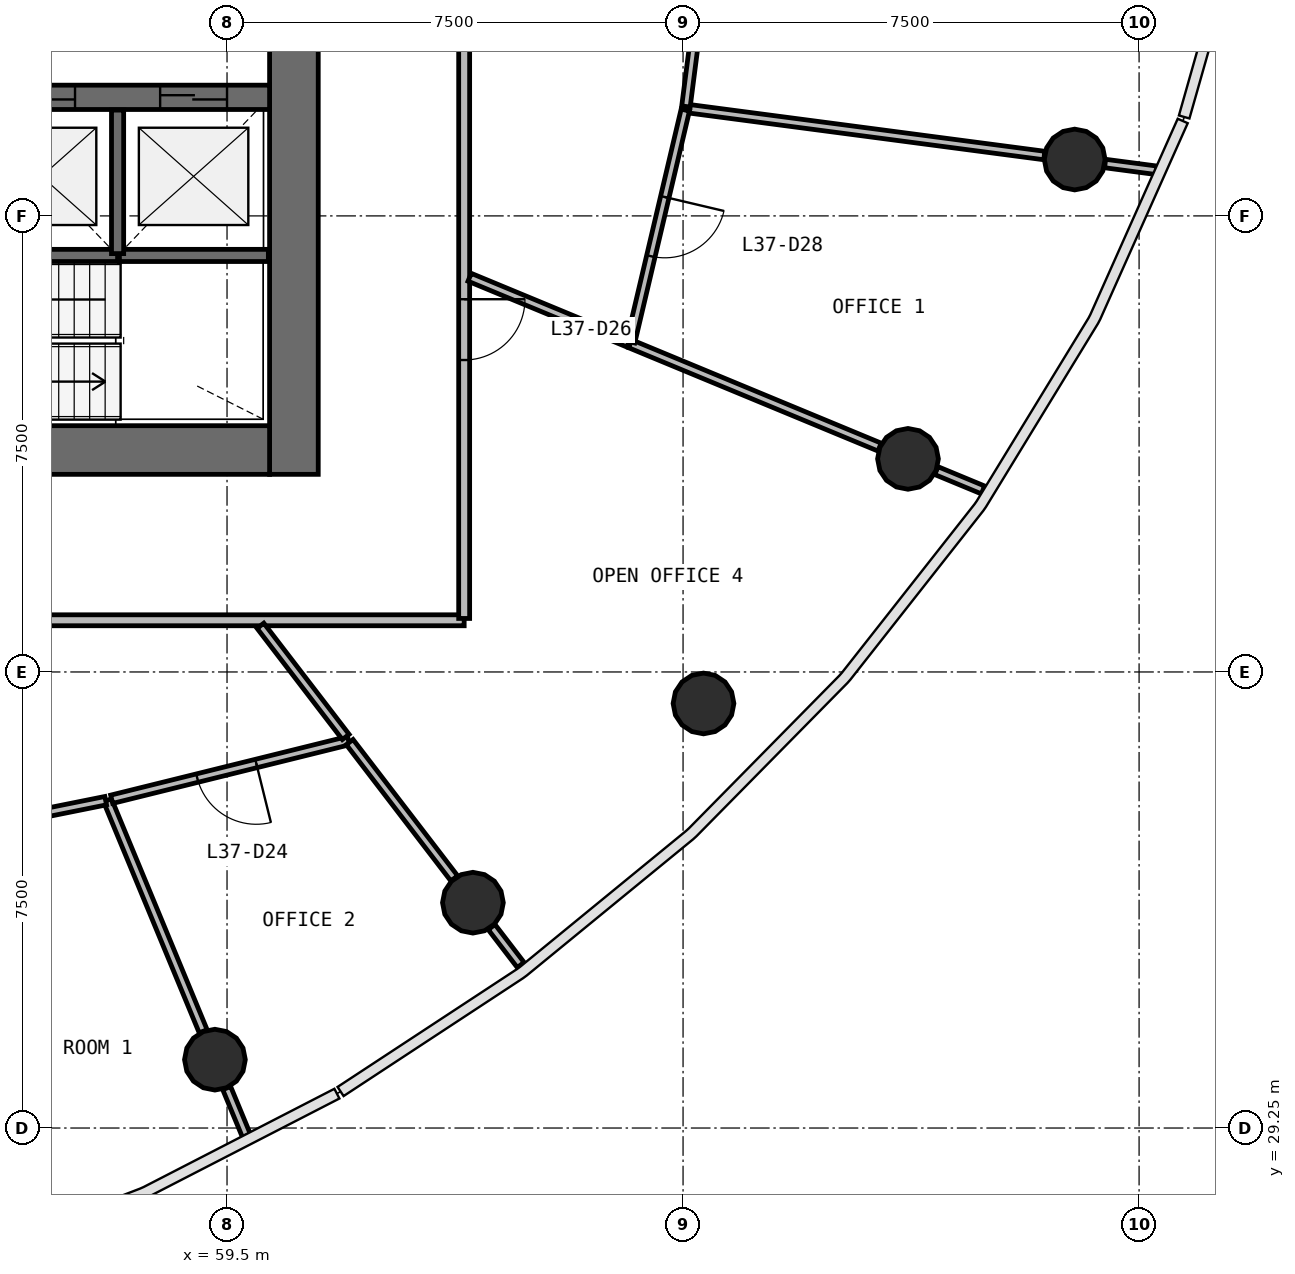
"""IFC4 building model, lengths in metres.
Left out: names, types, materials, properties, quantities, classifications, styles, units other than length and angle.
Written with IfcOpenShell. Run it as: python <this file> out.ifc"""

import sys

from ifc_helpers import new_model, si_unit, direction, frame, frame_2d, origin, origin_2d, place, context, subcontext, project, spatial, rectangle, circle, extrude, source, transform, mapped, element, fill, save


model = new_model("IFC4")
c1 = context("Model", 3, precision=1e-05, world=origin(), true_north=direction((0.0, 1.0)))
c2 = subcontext(c1, "Body", "Model", "MODEL_VIEW")
j1 = project(units=[si_unit("LENGTHUNIT", "METRE"), si_unit("PLANEANGLEUNIT", "RADIAN")], contexts=[c1])
p1 = place(None, origin())
s1 = spatial("IfcSite", under=j1, at=p1, CompositionType="ELEMENT")
p2 = place(p1, origin())
s2 = spatial("IfcBuilding", under=s1, at=p2, CompositionType="ELEMENT")
p3 = place(p2, frame((0.0, 0.0, 156.5)))
s3 = spatial("IfcBuildingStorey", under=s2, at=p3, CompositionType="ELEMENT", Elevation=156.5)
p4 = place(p3, frame((60.6, 40.0, 0.0), z_axis=(0.0, 0.0, 1.0), x_axis=(0.0, 1.0, 0.0)))
e1 = element("IfcWall", 1, at=p4, inside=s3, PredefinedType="SHEAR", context=c2, shape_type="SweptSolid", body=[
    extrude(rectangle(XDim=16.0, YDim=0.8, at=frame_2d((8.0, 0.0))), origin(), (0.0, 0.0, 1.0), 3.9),
])
p5 = place(p4, frame((7.1, 0.0, 0.0)))
e2 = element("IfcOpeningElement", 2, at=p5, cuts=e1, PredefinedType="OPENING", context=c2, shape_type="SweptSolid", body=[
    extrude(rectangle(XDim=1.8, YDim=2.1, at=frame_2d((0.9, 1.05))), frame((0.0, 0.41, 0.0), z_axis=(0.0, -1.0, 0.0), x_axis=(1.0, 0.0, 0.0)), (0.0, 0.0, 1.0), 0.82),
])
p6 = place(p3, frame((43.8, 40.4, 0.0), z_axis=(0.0, 0.0, 1.0), x_axis=(1.0, 0.0, 0.0)))
e3 = element("IfcWall", 3, at=p6, inside=s3, PredefinedType="SHEAR", context=c2, shape_type="SweptSolid", body=[
    extrude(rectangle(XDim=16.4, YDim=0.8, at=frame_2d((8.2, 0.0))), origin(), (0.0, 0.0, 1.0), 3.9),
])
p7 = place(p6, frame((10.1, 0.0, 0.0)))
e4 = element("IfcOpeningElement", 4, at=p7, cuts=e3, PredefinedType="OPENING", context=c2, shape_type="SweptSolid", body=[
    extrude(rectangle(XDim=1.2, YDim=2.1, at=frame_2d((0.6, 1.05))), frame((0.0, 0.41, 0.0), z_axis=(0.0, -1.0, 0.0), x_axis=(1.0, 0.0, 0.0)), (0.0, 0.0, 1.0), 0.82),
])
p8 = place(p6, frame((7.05, 0.0, 0.0)))
e5 = element("IfcOpeningElement", 5, at=p8, cuts=e3, PredefinedType="OPENING", context=c2, shape_type="SweptSolid", body=[
    extrude(rectangle(XDim=1.1, YDim=2.1, at=frame_2d((0.55, 1.05))), frame((0.0, 0.41, 0.0), z_axis=(0.0, -1.0, 0.0), x_axis=(1.0, 0.0, 0.0)), (0.0, 0.0, 1.0), 0.82),
])
p9 = place(p6, frame((0.5, 0.0, 0.0)))
e6 = element("IfcOpeningElement", 6, at=p9, cuts=e3, PredefinedType="OPENING", context=c2, shape_type="SweptSolid", body=[
    extrude(rectangle(XDim=0.8, YDim=2.1, at=frame_2d((0.4, 1.05))), frame((0.0, 0.41, 0.0), z_axis=(0.0, -1.0, 0.0), x_axis=(1.0, 0.0, 0.0)), (0.0, 0.0, 1.0), 0.82),
])
p10 = place(p3, frame((43.8, 46.2, 0.0), z_axis=(0.0, 0.0, 1.0), x_axis=(1.0, 0.0, 0.0)))
e7 = element("IfcWall", 7, at=p10, inside=s3, PredefinedType="SHEAR", context=c2, shape_type="SweptSolid", body=[
    extrude(rectangle(XDim=16.4, YDim=0.4, at=frame_2d((8.2, 0.0))), origin(), (0.0, 0.0, 1.0), 3.9),
])
p11 = place(p10, frame((9.6, 0.0, 0.0)))
e8 = element("IfcOpeningElement", 8, at=p11, cuts=e7, PredefinedType="OPENING", context=c2, shape_type="SweptSolid", body=[
    extrude(rectangle(XDim=1.1, YDim=2.1, at=frame_2d((0.55, 1.05))), frame((0.0, 0.21, 0.0), z_axis=(0.0, -1.0, 0.0), x_axis=(1.0, 0.0, 0.0)), (0.0, 0.0, 1.0), 0.42),
])
p12 = place(p10, frame((12.1, 0.0, 0.0)))
e9 = element("IfcOpeningElement", 9, at=p12, cuts=e7, PredefinedType="OPENING", context=c2, shape_type="SweptSolid", body=[
    extrude(rectangle(XDim=1.1, YDim=2.1, at=frame_2d((0.55, 1.05))), frame((0.0, 0.21, 0.0), z_axis=(0.0, -1.0, 0.0), x_axis=(1.0, 0.0, 0.0)), (0.0, 0.0, 1.0), 0.42),
])
p13 = place(p10, frame((14.6, 0.0, 0.0)))
e10 = element("IfcOpeningElement", 10, at=p13, cuts=e7, PredefinedType="OPENING", context=c2, shape_type="SweptSolid", body=[
    extrude(rectangle(XDim=1.1, YDim=2.1, at=frame_2d((0.55, 1.05))), frame((0.0, 0.21, 0.0), z_axis=(0.0, -1.0, 0.0), x_axis=(1.0, 0.0, 0.0)), (0.0, 0.0, 1.0), 0.42),
])
p14 = place(p10, frame((2.45, 0.0, 0.0)))
e11 = element("IfcOpeningElement", 11, at=p14, cuts=e7, PredefinedType="OPENING", context=c2, shape_type="SweptSolid", body=[
    extrude(rectangle(XDim=0.9, YDim=2.1, at=frame_2d((0.45, 1.05))), frame((0.0, 0.21, 0.0), z_axis=(0.0, -1.0, 0.0), x_axis=(1.0, 0.0, 0.0)), (0.0, 0.0, 1.0), 0.42),
])
p15 = place(p10, frame((7.65, 0.0, 0.0)))
e12 = element("IfcOpeningElement", 12, at=p15, cuts=e7, PredefinedType="OPENING", context=c2, shape_type="SweptSolid", body=[
    extrude(rectangle(XDim=0.9, YDim=2.1, at=frame_2d((0.45, 1.05))), frame((0.0, 0.21, 0.0), z_axis=(0.0, -1.0, 0.0), x_axis=(1.0, 0.0, 0.0)), (0.0, 0.0, 1.0), 0.42),
])
m1 = source(origin(), c2, "Body", "SweptSolid", [
    extrude(circle(Radius=0.5, at=origin_2d()), origin(), (0.0, 0.0, 1.0), 3.9),
])
for number, where, z_axis, x_axis in (
    (13, (59.301, 30.374, 0.0), (0.0, 0.0, 1.0), (1.0, 0.0, 0.0)),
    (14, (63.544, 32.956, 0.0), (0.0, 0.0, 1.0), (1.0, 0.0, 0.0)),
    (15, (67.336, 36.232, 0.0), (0.0, 0.0, 1.0), (1.0, 0.0, 0.0)),
    (16, (70.699, 40.254, 0.0), (0.0, 0.0, 1.0), (1.0, 0.0, 0.0)),
    (17, (73.441, 45.177, 0.0), (0.0, 0.0, 1.0), (1.0, 0.0, 0.0)),
):
    element("IfcColumn", number, at=place(p3, frame(where, z_axis=z_axis, x_axis=x_axis)), inside=s3, PredefinedType="COLUMN", context=c2, shape_type="MappedRepresentation", body=[
        mapped(m1, transform((0.0, 0.0, 0.0), scale=1.0)),
    ])
p16 = place(p3, frame((55.2, 43.6, 0.0), z_axis=(0.0, 0.0, 1.0), x_axis=(1.0, 0.0, 0.0)))
e18 = element("IfcWall", 18, at=p16, inside=s3, PredefinedType="SOLIDWALL", context=c2, shape_type="SweptSolid", body=[
    extrude(rectangle(XDim=2.5, YDim=0.2, at=frame_2d((1.25, 0.0))), origin(), (0.0, 0.0, 1.0), 3.58),
])
p17 = place(p3, frame((57.73, 43.6, 0.0), z_axis=(0.0, 0.0, 1.0), x_axis=(1.0, 0.0, 0.0)))
e19 = element("IfcWall", 19, at=p17, inside=s3, PredefinedType="SOLIDWALL", context=c2, shape_type="SweptSolid", body=[
    extrude(rectangle(XDim=2.45, YDim=0.2, at=frame_2d((1.225, 0.0))), origin(), (0.0, 0.0, 1.0), 3.58),
])
p18 = place(p3, frame((57.7, 43.63, 0.0), z_axis=(0.0, 0.0, 1.0), x_axis=(0.0, 1.0, 0.0)))
e20 = element("IfcWall", 20, at=p18, inside=s3, PredefinedType="SOLIDWALL", context=c2, shape_type="SweptSolid", body=[
    extrude(rectangle(XDim=2.36, YDim=0.2, at=frame_2d((1.18, 0.0))), origin(), (0.0, 0.0, 1.0), 3.58),
])
p19 = place(p3, frame((63.4, 37.6, 0.0), z_axis=(0.0, 0.0, 1.0), x_axis=(-1.0, 0.0, 0.0)))
e21 = element("IfcWall", 21, at=p19, inside=s3, PredefinedType="PARTITIONING", context=c2, shape_type="SweptSolid", body=[
    extrude(rectangle(XDim=22.8, YDim=0.18, at=frame_2d((11.4, 0.0))), origin(), (0.0, 0.0, 1.0), 2.88),
])
p20 = place(p19, frame((16.05, 0.0, 0.0)))
e22 = element("IfcOpeningElement", 22, at=p20, cuts=e21, PredefinedType="OPENING", context=c2, shape_type="SweptSolid", body=[
    extrude(rectangle(XDim=0.9, YDim=2.1, at=frame_2d((0.45, 1.05))), frame((0.0, 0.1, 0.0), z_axis=(0.0, -1.0, 0.0), x_axis=(1.0, 0.0, 0.0)), (0.0, 0.0, 1.0), 0.2),
])
p21 = place(p19, frame((13.05, 0.0, 0.0)))
e23 = element("IfcOpeningElement", 23, at=p21, cuts=e21, PredefinedType="OPENING", context=c2, shape_type="SweptSolid", body=[
    extrude(rectangle(XDim=0.9, YDim=2.1, at=frame_2d((0.45, 1.05))), frame((0.0, 0.1, 0.0), z_axis=(0.0, -1.0, 0.0), x_axis=(1.0, 0.0, 0.0)), (0.0, 0.0, 1.0), 0.2),
])
p22 = place(p19, frame((10.95, 0.0, 0.0)))
e24 = element("IfcOpeningElement", 24, at=p22, cuts=e21, PredefinedType="OPENING", context=c2, shape_type="SweptSolid", body=[
    extrude(rectangle(XDim=1.0, YDim=2.1, at=frame_2d((0.5, 1.05))), frame((0.0, 0.1, 0.0), z_axis=(0.0, -1.0, 0.0), x_axis=(1.0, 0.0, 0.0)), (0.0, 0.0, 1.0), 0.2),
])
p23 = place(p19, frame((19.95, 0.0, 0.0)))
e25 = element("IfcOpeningElement", 25, at=p23, cuts=e21, PredefinedType="OPENING", context=c2, shape_type="SweptSolid", body=[
    extrude(rectangle(XDim=1.0, YDim=2.1, at=frame_2d((0.5, 1.05))), frame((0.0, 0.1, 0.0), z_axis=(0.0, -1.0, 0.0), x_axis=(1.0, 0.0, 0.0)), (0.0, 0.0, 1.0), 0.2),
])
p24 = place(p3, frame((63.4, 58.37, 0.0), z_axis=(0.0, 0.0, 1.0), x_axis=(0.0, -1.0, 0.0)))
e26 = element("IfcWall", 26, at=p24, inside=s3, PredefinedType="PARTITIONING", context=c2, shape_type="SweptSolid", body=[
    extrude(rectangle(XDim=20.74, YDim=0.18, at=frame_2d((10.37, 0.0))), origin(), (0.0, 0.0, 1.0), 2.88),
])
p25 = place(p24, frame((15.49, 0.0, 0.0)))
e27 = element("IfcOpeningElement", 27, at=p25, cuts=e26, PredefinedType="OPENING", context=c2, shape_type="SweptSolid", body=[
    extrude(rectangle(XDim=1.0, YDim=2.1, at=frame_2d((0.5, 1.05))), frame((0.0, 0.1, 0.0), z_axis=(0.0, -1.0, 0.0), x_axis=(1.0, 0.0, 0.0)), (0.0, 0.0, 1.0), 0.2),
])
p26 = place(p24, frame((9.89, 0.0, 0.0)))
e28 = element("IfcOpeningElement", 28, at=p26, cuts=e26, PredefinedType="OPENING", context=c2, shape_type="SweptSolid", body=[
    extrude(rectangle(XDim=1.0, YDim=2.1, at=frame_2d((0.5, 1.05))), frame((0.0, 0.1, 0.0), z_axis=(0.0, -1.0, 0.0), x_axis=(1.0, 0.0, 0.0)), (0.0, 0.0, 1.0), 0.2),
])
p27 = place(p3, frame((67.044, 46.019, 0.0), z_axis=(0.0, 0.0, 1.0), x_axis=(0.991450523091, -0.13048318, 0.0)))
e29 = element("IfcWall", 29, at=p27, inside=s3, PredefinedType="PARTITIONING", context=c2, shape_type="SweptSolid", body=[
    extrude(rectangle(XDim=5.948, YDim=0.14, at=frame_2d((2.974, 0.0))), origin(), (0.0, 0.0, 1.0), 2.88),
])
p28 = place(p3, frame((66.131, 42.147, 0.0), z_axis=(0.0, 0.0, 1.0), x_axis=(0.923872072557, -0.382701441792, 0.0)))
e30 = element("IfcWall", 30, at=p28, inside=s3, PredefinedType="PARTITIONING", context=c2, shape_type="SweptSolid", body=[
    extrude(rectangle(XDim=4.44, YDim=0.14, at=frame_2d((2.22, 0.0))), origin(), (0.0, 0.0, 1.0), 2.88),
])
p29 = place(p3, frame((57.534, 34.639, 0.0), z_axis=(0.0, 0.0, 1.0), x_axis=(0.382696163026, -0.923874259196, 0.0)))
e31 = element("IfcWall", 31, at=p29, inside=s3, PredefinedType="PARTITIONING", context=c2, shape_type="SweptSolid", body=[
    extrude(rectangle(XDim=4.112, YDim=0.14, at=frame_2d((2.056, 0.0))), origin(), (0.0, 0.0, 1.0), 2.88),
])
p30 = place(p3, frame((61.499, 35.621, 0.0), z_axis=(0.0, 0.0, 1.0), x_axis=(-0.970705214058, -0.240273567836, 0.0)))
e32 = element("IfcWall", 32, at=p30, inside=s3, PredefinedType="PARTITIONING", context=c2, shape_type="SweptSolid", body=[
    extrude(rectangle(XDim=4.014, YDim=0.14, at=frame_2d((2.007, 0.0))), origin(), (0.0, 0.0, 1.0), 2.88),
])
p31 = place(p30, frame((1.563, 0.0, 0.0)))
e33 = element("IfcOpeningElement", 33, at=p31, cuts=e32, PredefinedType="OPENING", context=c2, shape_type="SweptSolid", body=[
    extrude(rectangle(XDim=1.0, YDim=2.1, at=frame_2d((0.5, 1.05))), frame((0.0, 0.08, 0.0), z_axis=(0.0, -1.0, 0.0), x_axis=(1.0, 0.0, 0.0)), (0.0, 0.0, 1.0), 0.16),
])
p32 = place(p3, frame((67.557, 50.019, 0.0), z_axis=(0.0, 0.0, 1.0), x_axis=(-0.127375141881, -0.99185461295, 0.0)))
e34 = element("IfcWall", 34, at=p32, inside=s3, PredefinedType="PARTITIONING", context=c2, shape_type="SweptSolid", body=[
    extrude(rectangle(XDim=4.002, YDim=0.14, at=frame_2d((2.001, 0.0))), origin(), (0.0, 0.0, 1.0), 2.88),
])
p33 = place(p32, frame((1.552, 0.0, 0.0)))
e35 = element("IfcOpeningElement", 35, at=p33, cuts=e34, PredefinedType="OPENING", context=c2, shape_type="SweptSolid", body=[
    extrude(rectangle(XDim=1.0, YDim=2.1, at=frame_2d((0.5, 1.05))), frame((0.0, 0.08, 0.0), z_axis=(0.0, -1.0, 0.0), x_axis=(1.0, 0.0, 0.0)), (0.0, 0.0, 1.0), 0.16),
])
p34 = place(p3, frame((67.037, 45.99, 0.0), z_axis=(0.0, 0.0, 1.0), x_axis=(-0.229452538662, -0.973319851077, 0.0)))
e36 = element("IfcWall", 36, at=p34, inside=s3, PredefinedType="PARTITIONING", context=c2, shape_type="SweptSolid", body=[
    extrude(rectangle(XDim=3.919, YDim=0.14, at=frame_2d((1.959, 0.0))), origin(), (0.0, 0.0, 1.0), 2.88),
])
p35 = place(p34, frame((1.469, 0.0, 0.0)))
e37 = element("IfcOpeningElement", 37, at=p35, cuts=e36, PredefinedType="OPENING", context=c2, shape_type="SweptSolid", body=[
    extrude(rectangle(XDim=1.0, YDim=2.1, at=frame_2d((0.5, 1.05))), frame((0.0, 0.08, 0.0), z_axis=(0.0, -1.0, 0.0), x_axis=(1.0, 0.0, 0.0)), (0.0, 0.0, 1.0), 0.16),
])
p36 = place(p3, frame((57.505, 34.634, 0.0), z_axis=(0.0, 0.0, 1.0), x_axis=(-0.980399657824, -0.197019062376, 0.0)))
e38 = element("IfcWall", 38, at=p36, inside=s3, PredefinedType="PARTITIONING", context=c2, shape_type="SweptSolid", body=[
    extrude(rectangle(XDim=3.691, YDim=0.14, at=frame_2d((1.846, 0.0))), origin(), (0.0, 0.0, 1.0), 2.88),
])
p37 = place(p36, frame((1.441, 0.0, 0.0)))
e39 = element("IfcOpeningElement", 39, at=p37, cuts=e38, PredefinedType="OPENING", context=c2, shape_type="SweptSolid", body=[
    extrude(rectangle(XDim=1.0, YDim=2.1, at=frame_2d((0.5, 1.05))), frame((0.0, 0.08, 0.0), z_axis=(0.0, -1.0, 0.0), x_axis=(1.0, 0.0, 0.0)), (0.0, 0.0, 1.0), 0.16),
])
p38 = place(p3, frame((63.49, 43.241, 0.0), z_axis=(0.0, 0.0, 1.0), x_axis=(0.923859015747, -0.382732960462, 0.0)))
e40 = element("IfcWall", 40, at=p38, inside=s3, PredefinedType="PARTITIONING", context=c2, shape_type="SweptSolid", body=[
    extrude(rectangle(XDim=2.828, YDim=0.14, at=frame_2d((1.414, 0.0))), origin(), (0.0, 0.0, 1.0), 2.88),
])
p39 = place(p3, frame((61.517, 35.597, 0.0), z_axis=(0.0, 0.0, 1.0), x_axis=(0.608716333524, -0.793387941238, 0.0)))
e41 = element("IfcWall", 41, at=p39, inside=s3, PredefinedType="PARTITIONING", context=c2, shape_type="SweptSolid", body=[
    extrude(rectangle(XDim=2.825, YDim=0.14, at=frame_2d((1.413, 0.0))), origin(), (0.0, 0.0, 1.0), 2.88),
])
p40 = place(p3, frame((60.049, 37.51, 0.0), z_axis=(0.0, 0.0, 1.0), x_axis=(0.608742818772, -0.793367620081, 0.0)))
e42 = element("IfcWall", 42, at=p40, inside=s3, PredefinedType="PARTITIONING", context=c2, shape_type="SweptSolid", body=[
    extrude(rectangle(XDim=2.305, YDim=0.14, at=frame_2d((1.152, 0.0))), origin(), (0.0, 0.0, 1.0), 2.88),
])
p41 = place(p3, frame((73.941, 45.111, 0.0), z_axis=(0.0, 0.0, 1.0), x_axis=(0.991446500326, -0.130513742537, 0.0)))
e43 = element("IfcWall", 43, at=p41, inside=s3, PredefinedType="PARTITIONING", context=c2, shape_type="SweptSolid", body=[
    extrude(rectangle(XDim=0.853, YDim=0.14, at=frame_2d((0.427, 0.0))), origin(), (0.0, 0.0, 1.0), 2.88),
])
p42 = place(p3, frame((59.494, 29.908, 0.0), z_axis=(0.0, 0.0, 1.0), x_axis=(0.382722863119, -0.923863198772, 0.0)))
e44 = element("IfcWall", 44, at=p42, inside=s3, PredefinedType="PARTITIONING", context=c2, shape_type="SweptSolid", body=[
    extrude(rectangle(XDim=0.852, YDim=0.14, at=frame_2d((0.426, 0.0))), origin(), (0.0, 0.0, 1.0), 2.88),
])
p43 = place(p3, frame((71.166, 40.061, 0.0), z_axis=(0.0, 0.0, 1.0), x_axis=(0.923909393783, -0.382611332921, 0.0)))
e45 = element("IfcWall", 45, at=p43, inside=s3, PredefinedType="PARTITIONING", context=c2, shape_type="SweptSolid", body=[
    extrude(rectangle(XDim=0.831, YDim=0.14, at=frame_2d((0.416, 0.0))), origin(), (0.0, 0.0, 1.0), 2.88),
])
p44 = place(p3, frame((63.851, 32.555, 0.0), z_axis=(0.0, 0.0, 1.0), x_axis=(0.608659697441, -0.793431391307, 0.0)))
e46 = element("IfcWall", 46, at=p44, inside=s3, PredefinedType="PARTITIONING", context=c2, shape_type="SweptSolid", body=[
    extrude(rectangle(XDim=0.786, YDim=0.14, at=frame_2d((0.393, 0.0))), origin(), (0.0, 0.0, 1.0), 2.88),
])
m2 = source(origin(), c2, "Body", "SweptSolid", [
    extrude(rectangle(XDim=1.1, YDim=2.1, at=frame_2d((0.55, 1.05))), frame((0.0, 0.025, 0.0), z_axis=(0.0, -1.0, 0.0), x_axis=(1.0, 0.0, 0.0)), (0.0, 0.0, 1.0), 0.05),
])
p45 = place(p12, origin())
e47 = element("IfcDoor", 47, at=p45, inside=s3, OperationType="DOUBLE_DOOR_SLIDING", PredefinedType="USERDEFINED", context=c2, shape_type="MappedRepresentation", body=[
    mapped(m2, transform((0.0, 0.0, 0.0), scale=1.0)),
])
fill(e9, e47)
p46 = place(p13, origin())
e48 = element("IfcDoor", 48, at=p46, inside=s3, OperationType="DOUBLE_DOOR_SLIDING", PredefinedType="USERDEFINED", context=c2, shape_type="MappedRepresentation", body=[
    mapped(m2, transform((0.0, 0.0, 0.0), scale=1.0)),
])
fill(e10, e48)
m3 = source(origin(), c2, "Body", "SweptSolid", [
    extrude(rectangle(XDim=1.0, YDim=2.1, at=frame_2d((0.5, 1.05))), frame((0.0, 0.025, 0.0), z_axis=(0.0, -1.0, 0.0), x_axis=(1.0, 0.0, 0.0)), (0.0, 0.0, 1.0), 0.05),
])
p47 = place(p31, origin())
e49 = element("IfcDoor", 49, at=p47, inside=s3, OperationType="SINGLE_SWING_LEFT", PredefinedType="DOOR", context=c2, shape_type="MappedRepresentation", body=[
    mapped(m3, transform((0.0, 0.0, 0.0), scale=1.0)),
])
fill(e33, e49)
p48 = place(p25, origin())
e50 = element("IfcDoor", 50, at=p48, inside=s3, OperationType="SINGLE_SWING_LEFT", PredefinedType="DOOR", context=c2, shape_type="MappedRepresentation", body=[
    mapped(m3, transform((0.0, 0.0, 0.0), scale=1.0)),
])
fill(e27, e50)
p49 = place(p35, origin())
e51 = element("IfcDoor", 51, at=p49, inside=s3, OperationType="SINGLE_SWING_LEFT", PredefinedType="DOOR", context=c2, shape_type="MappedRepresentation", body=[
    mapped(m3, transform((0.0, 0.0, 0.0), scale=1.0)),
])
fill(e37, e51)
save(model, sys.argv[1])
